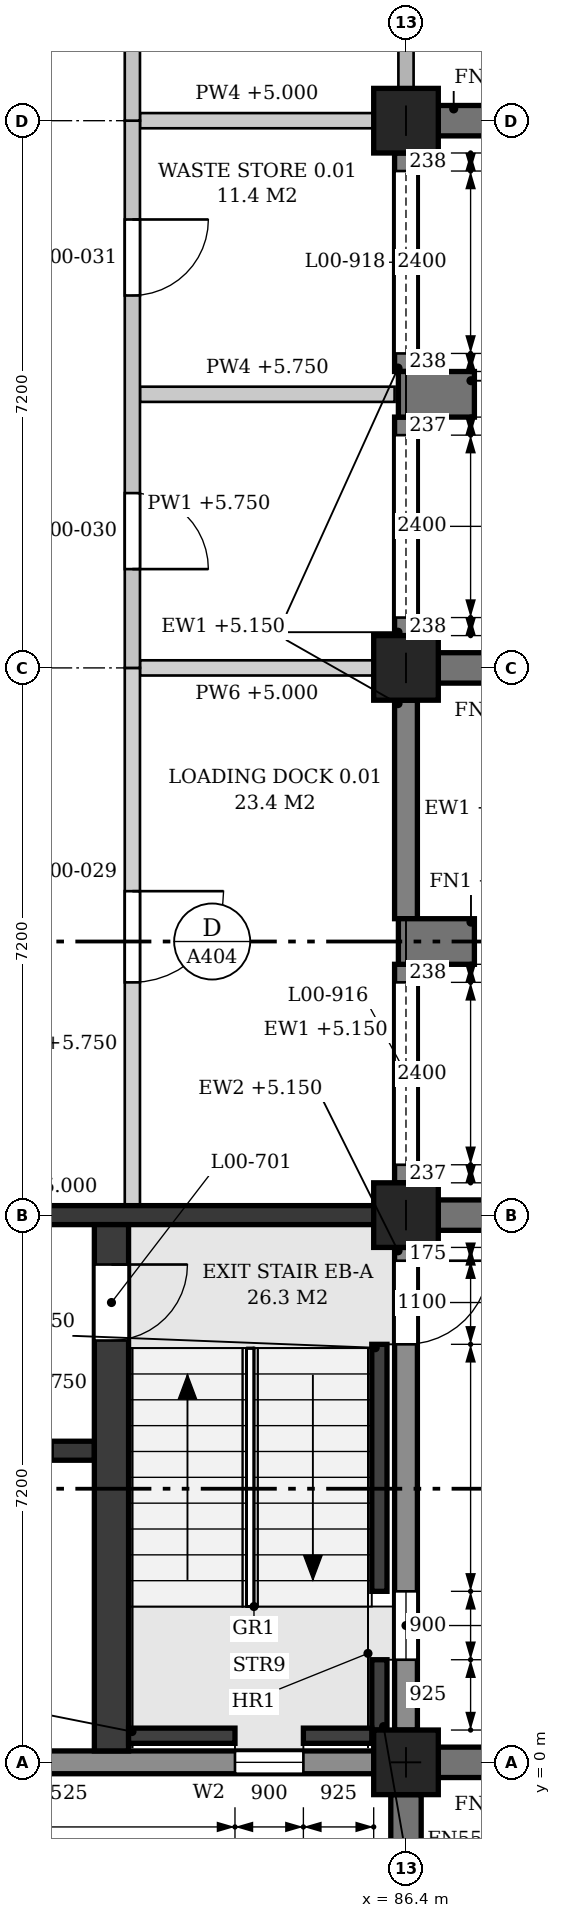
"""IFC4 building model, lengths in metres.
Left out: names, types, materials, properties, quantities, classifications, styles, units other than length and angle.
Written with IfcOpenShell. Run it as: python <this file> out.ifc"""

import sys

from ifc_helpers import new_model, si_unit, direction, frame, frame_2d, origin, origin_2d, place, context, subcontext, project, spatial, polyline, rectangle, outline, extrude, element, fill, save


model = new_model("IFC4")
c1 = context("Model", 3, precision=1e-05, world=origin(), true_north=direction((0.0, 1.0)))
c2 = subcontext(c1, "Body", "Model", "MODEL_VIEW")
j1 = project(units=[si_unit("LENGTHUNIT", "METRE"), si_unit("PLANEANGLEUNIT", "RADIAN")], contexts=[c1])
p1 = place(None, origin())
s1 = spatial("IfcSite", under=j1, at=p1, CompositionType="ELEMENT")
p2 = place(p1, origin())
s2 = spatial("IfcBuilding", under=s1, at=p2, CompositionType="ELEMENT")
p3 = place(p2, origin())
s3 = spatial("IfcBuildingStorey", under=s2, at=p3, CompositionType="ELEMENT", Elevation=0.0)
for number, where, z_axis, x_axis in (
    (1, (86.4, 0.0, 0.0), (0.0, 0.0, 1.0), (1.0, 0.0, 0.0)),
    (2, (86.4, 7.2, 0.0), (0.0, 0.0, 1.0), (1.0, 0.0, 0.0)),
    (3, (86.4, 14.4, 0.0), (0.0, 0.0, 1.0), (1.0, 0.0, 0.0)),
    (4, (86.4, 21.6, 0.0), (0.0, 0.0, 1.0), (1.0, 0.0, 0.0)),
):
    element("IfcColumn", number, at=place(p3, frame(where, z_axis=z_axis, x_axis=x_axis)), inside=s3, PredefinedType="COLUMN", context=c2, shape_type="SweptSolid", body=[
        extrude(rectangle(XDim=0.85, YDim=0.85, at=origin_2d()), origin(), (0.0, 0.0, 1.0), 6.0),
    ])
p4 = place(p3, frame((79.625, 0.0, 0.0), z_axis=(0.0, 0.0, 1.0), x_axis=(1.0, 0.0, 0.0)))
e5 = element("IfcWall", 5, at=p4, inside=s3, PredefinedType="STANDARD", context=c2, shape_type="SweptSolid", body=[
    extrude(rectangle(XDim=6.35, YDim=0.3, at=frame_2d((3.175, 0.0))), origin(), (0.0, 0.0, 1.0), 5.15),
])
p5 = place(p4, frame((4.525, 0.0, 0.9)))
e6 = element("IfcOpeningElement", 6, at=p5, cuts=e5, PredefinedType="OPENING", context=c2, shape_type="SweptSolid", body=[
    extrude(outline(polyline([(0.0, 0.0), (0.9, 0.0), (0.9, 3.55), (0.45, 4.0), (0.0, 3.55), (0.0, 0.0)])), frame((0.0, 0.16, 0.0), z_axis=(0.0, -1.0, 0.0), x_axis=(1.0, 0.0, 0.0)), (0.0, 0.0, 1.0), 0.32),
])
p6 = place(p3, frame((86.4, 0.425, 0.0), z_axis=(0.0, 0.0, 1.0), x_axis=(0.0, 1.0, 0.0)))
e7 = element("IfcWall", 7, at=p6, inside=s3, PredefinedType="STANDARD", context=c2, shape_type="SweptSolid", body=[
    extrude(rectangle(XDim=6.35, YDim=0.3, at=frame_2d((3.175, 0.0))), origin(), (0.0, 0.0, 1.0), 5.15),
])
p7 = place(p6, frame((5.075, 0.0, 0.0)))
e8 = element("IfcOpeningElement", 8, at=p7, cuts=e7, PredefinedType="OPENING", context=c2, shape_type="SweptSolid", body=[
    extrude(rectangle(XDim=1.1, YDim=2.1, at=frame_2d((0.55, 1.05))), frame((0.0, 0.16, 0.0), z_axis=(0.0, -1.0, 0.0), x_axis=(1.0, 0.0, 0.0)), (0.0, 0.0, 1.0), 0.32),
])
p8 = place(p6, frame((0.925, 0.0, 0.9)))
e9 = element("IfcOpeningElement", 9, at=p8, cuts=e7, PredefinedType="OPENING", context=c2, shape_type="SweptSolid", body=[
    extrude(outline(polyline([(0.0, 0.0), (0.9, 0.0), (0.9, 3.55), (0.45, 4.0), (0.0, 3.55), (0.0, 0.0)])), frame((0.0, 0.16, 0.0), z_axis=(0.0, -1.0, 0.0), x_axis=(1.0, 0.0, 0.0)), (0.0, 0.0, 1.0), 0.32),
])
p9 = place(p3, frame((86.4, 7.625, 0.0), z_axis=(0.0, 0.0, 1.0), x_axis=(0.0, 1.0, 0.0)))
e10 = element("IfcWall", 10, at=p9, inside=s3, PredefinedType="STANDARD", context=c2, shape_type="SweptSolid", body=[
    extrude(rectangle(XDim=2.875, YDim=0.3, at=frame_2d((1.438, 0.0))), origin(), (0.0, 0.0, 1.0), 5.15),
])
p10 = place(p9, frame((0.238, 0.0, 0.0)))
e11 = element("IfcOpeningElement", 11, at=p10, cuts=e10, PredefinedType="OPENING", context=c2, shape_type="SweptSolid", body=[
    extrude(rectangle(XDim=2.4, YDim=3.5, at=frame_2d((1.2, 1.75))), frame((0.0, 0.16, 0.0), z_axis=(0.0, -1.0, 0.0), x_axis=(1.0, 0.0, 0.0)), (0.0, 0.0, 1.0), 0.32),
])
p11 = place(p3, frame((86.4, 11.1, 0.0), z_axis=(0.0, 0.0, 1.0), x_axis=(0.0, 1.0, 0.0)))
e12 = element("IfcWall", 12, at=p11, inside=s3, PredefinedType="STANDARD", context=c2, shape_type="SweptSolid", body=[
    extrude(rectangle(XDim=2.875, YDim=0.3, at=frame_2d((1.438, 0.0))), origin(), (0.0, 0.0, 1.0), 5.15),
])
p12 = place(p3, frame((86.4, 14.825, 0.0), z_axis=(0.0, 0.0, 1.0), x_axis=(0.0, 1.0, 0.0)))
e13 = element("IfcWall", 13, at=p12, inside=s3, PredefinedType="STANDARD", context=c2, shape_type="SweptSolid", body=[
    extrude(rectangle(XDim=2.875, YDim=0.3, at=frame_2d((1.438, 0.0))), origin(), (0.0, 0.0, 1.0), 5.15),
])
p13 = place(p12, frame((0.238, 0.0, 0.0)))
e14 = element("IfcOpeningElement", 14, at=p13, cuts=e13, PredefinedType="OPENING", context=c2, shape_type="SweptSolid", body=[
    extrude(rectangle(XDim=2.4, YDim=3.5, at=frame_2d((1.2, 1.75))), frame((0.0, 0.16, 0.0), z_axis=(0.0, -1.0, 0.0), x_axis=(1.0, 0.0, 0.0)), (0.0, 0.0, 1.0), 0.32),
])
p14 = place(p3, frame((86.4, 18.3, 0.0), z_axis=(0.0, 0.0, 1.0), x_axis=(0.0, 1.0, 0.0)))
e15 = element("IfcWall", 15, at=p14, inside=s3, PredefinedType="STANDARD", context=c2, shape_type="SweptSolid", body=[
    extrude(rectangle(XDim=2.875, YDim=0.3, at=frame_2d((1.438, 0.0))), origin(), (0.0, 0.0, 1.0), 5.15),
])
p15 = place(p14, frame((0.238, 0.0, 0.0)))
e16 = element("IfcOpeningElement", 16, at=p15, cuts=e15, PredefinedType="OPENING", context=c2, shape_type="SweptSolid", body=[
    extrude(rectangle(XDim=2.4, YDim=3.5, at=frame_2d((1.2, 1.75))), frame((0.0, 0.16, 0.0), z_axis=(0.0, -1.0, 0.0), x_axis=(1.0, 0.0, 0.0)), (0.0, 0.0, 1.0), 0.32),
])
for number, where, z_axis, x_axis in (
    (17, (86.3, 10.8, 0.0), (0.0, 0.0, 1.0), (1.0, 0.0, 0.0)),
    (18, (86.3, 18.0, 0.0), (0.0, 0.0, 1.0), (1.0, 0.0, 0.0)),
):
    element("IfcWall", number, at=place(p3, frame(where, z_axis=z_axis, x_axis=x_axis)), inside=s3, PredefinedType="POLYGONAL", context=c2, shape_type="SweptSolid", body=[
        extrude(outline(polyline([(1.0, 0.0), (1.0, 20.975), (0.75, 21.35), (0.35, 21.35), (0.35, 20.75), (0.0, 20.75), (0.0, 16.8), (0.35, 16.8), (0.35, 15.95), (0.0, 15.95), (0.0, 11.4), (0.35, 11.4), (0.35, 10.55), (0.0, 10.55), (0.0, 6.0), (0.35, 6.0), (0.35, 5.15), (0.0, 5.15), (0.0, 0.0), (1.0, 0.0)])), frame((0.0, 0.3, 0.0), z_axis=(0.0, -1.0, 0.0), x_axis=(1.0, 0.0, 0.0)), (0.0, 0.0, 1.0), 0.6),
    ])
for number, where, z_axis, x_axis in (
    (19, (86.4, -0.425, 0.0), (0.0, 0.0, 1.0), (0.0, -1.0, 0.0)),
    (20, (86.825, 0.0, 0.0), (0.0, 0.0, 1.0), (1.0, 0.0, 0.0)),
    (21, (86.825, 7.2, 0.0), (0.0, 0.0, 1.0), (1.0, 0.0, 0.0)),
    (22, (86.825, 14.4, 0.0), (0.0, 0.0, 1.0), (1.0, 0.0, 0.0)),
    (23, (86.825, 21.6, 0.0), (0.0, 0.0, 1.0), (1.0, 0.0, 0.0)),
):
    element("IfcWall", number, at=place(p3, frame(where, z_axis=z_axis, x_axis=x_axis)), inside=s3, PredefinedType="POLYGONAL", context=c2, shape_type="SweptSolid", body=[
        extrude(outline(polyline([(1.2, 0.0), (1.2, 20.825), (0.85, 21.35), (0.0, 21.35), (0.0, 0.0), (1.2, 0.0)])), frame((0.0, 0.2, 0.0), z_axis=(0.0, -1.0, 0.0), x_axis=(1.0, 0.0, 0.0)), (0.0, 0.0, 1.0), 0.4),
    ])
p16 = place(p3, frame((79.625, 7.2, 0.0), z_axis=(0.0, 0.0, 1.0), x_axis=(1.0, 0.0, 0.0)))
e24 = element("IfcWall", 24, at=p16, inside=s3, PredefinedType="SHEAR", context=c2, shape_type="SweptSolid", body=[
    extrude(rectangle(XDim=6.35, YDim=0.25, at=frame_2d((3.175, 0.0))), origin(), (0.0, 0.0, 1.0), 5.0),
])
p17 = place(p16, frame((0.425, 0.0, 0.0)))
e25 = element("IfcOpeningElement", 25, at=p17, cuts=e24, PredefinedType="OPENING", context=c2, shape_type="SweptSolid", body=[
    extrude(rectangle(XDim=1.1, YDim=2.1, at=frame_2d((0.55, 1.05))), frame((0.0, 0.135, 0.0), z_axis=(0.0, -1.0, 0.0), x_axis=(1.0, 0.0, 0.0)), (0.0, 0.0, 1.0), 0.27),
])
p18 = place(p3, frame((86.05, 0.425, -0.3), z_axis=(0.0, 0.0, 1.0), x_axis=(0.0, 1.0, 0.0)))
e26 = element("IfcWall", 26, at=p18, inside=s3, PredefinedType="SHEAR", context=c2, shape_type="SweptSolid", body=[
    extrude(rectangle(XDim=0.925, YDim=0.2, at=frame_2d((0.462, 0.0))), origin(), (0.0, 0.0, 1.0), 6.05),
])
p19 = place(p3, frame((86.05, 2.25, -0.3), z_axis=(0.0, 0.0, 1.0), x_axis=(0.0, 1.0, 0.0)))
e27 = element("IfcWall", 27, at=p19, inside=s3, PredefinedType="SHEAR", context=c2, shape_type="SweptSolid", body=[
    extrude(rectangle(XDim=3.25, YDim=0.2, at=frame_2d((1.625, 0.0))), origin(), (0.0, 0.0, 1.0), 6.05),
])
p20 = place(p3, frame((82.75, 0.35, -0.3), z_axis=(0.0, 0.0, 1.0), x_axis=(1.0, 0.0, 0.0)))
e28 = element("IfcWall", 28, at=p20, inside=s3, PredefinedType="SHEAR", context=c2, shape_type="SweptSolid", body=[
    extrude(rectangle(XDim=1.4, YDim=0.2, at=frame_2d((0.7, 0.0))), origin(), (0.0, 0.0, 1.0), 6.05),
])
p21 = place(p3, frame((85.05, 0.35, -0.3), z_axis=(0.0, 0.0, 1.0), x_axis=(1.0, 0.0, 0.0)))
e29 = element("IfcWall", 29, at=p21, inside=s3, PredefinedType="SHEAR", context=c2, shape_type="SweptSolid", body=[
    extrude(rectangle(XDim=0.9, YDim=0.2, at=frame_2d((0.45, 0.0))), origin(), (0.0, 0.0, 1.0), 6.05),
])
p22 = place(p3, frame((82.525, 0.15, 0.0), z_axis=(0.0, 0.0, 1.0), x_axis=(0.0, 1.0, 0.0)))
e30 = element("IfcWall", 30, at=p22, inside=s3, PredefinedType="SHEAR", context=c2, shape_type="SweptSolid", body=[
    extrude(rectangle(XDim=6.925, YDim=0.45, at=frame_2d((3.462, 0.0))), origin(), (0.0, 0.0, 1.0), 5.75),
])
p23 = place(p22, frame((5.4, 0.0, 0.0)))
e31 = element("IfcOpeningElement", 31, at=p23, cuts=e30, PredefinedType="OPENING", context=c2, shape_type="SweptSolid", body=[
    extrude(rectangle(XDim=1.0, YDim=2.1, at=frame_2d((0.5, 1.05))), frame((0.0, 0.235, 0.0), z_axis=(0.0, -1.0, 0.0), x_axis=(1.0, 0.0, 0.0)), (0.0, 0.0, 1.0), 0.47),
])
p24 = place(p3, frame((79.325, 4.1, 0.0), z_axis=(0.0, 0.0, 1.0), x_axis=(1.0, 0.0, 0.0)))
e32 = element("IfcWall", 32, at=p24, inside=s3, PredefinedType="SHEAR", context=c2, shape_type="SweptSolid", body=[
    extrude(rectangle(XDim=2.975, YDim=0.25, at=frame_2d((1.488, 0.0))), origin(), (0.0, 0.0, 1.0), 5.75),
])
p25 = place(p24, frame((1.525, 0.0, 0.0)))
e33 = element("IfcOpeningElement", 33, at=p25, cuts=e32, PredefinedType="OPENING", context=c2, shape_type="SweptSolid", body=[
    extrude(rectangle(XDim=0.9, YDim=2.1, at=frame_2d((0.45, 1.05))), frame((0.0, 0.135, 0.0), z_axis=(0.0, -1.0, 0.0), x_axis=(1.0, 0.0, 0.0)), (0.0, 0.0, 1.0), 0.27),
])
p26 = place(p3, frame((82.9, 14.4, 0.0), z_axis=(0.0, 0.0, 1.0), x_axis=(1.0, 0.0, 0.0)))
e34 = element("IfcWall", 34, at=p26, inside=s3, PredefinedType="PARTITIONING", context=c2, shape_type="SweptSolid", body=[
    extrude(rectangle(XDim=3.075, YDim=0.2, at=frame_2d((1.538, 0.0))), origin(), (0.0, 0.0, 1.0), 5.0),
])
p27 = place(p3, frame((82.9, 18.0, 0.0), z_axis=(0.0, 0.0, 1.0), x_axis=(1.0, 0.0, 0.0)))
e35 = element("IfcWall", 35, at=p27, inside=s3, PredefinedType="PARTITIONING", context=c2, shape_type="SweptSolid", body=[
    extrude(outline(polyline([(0.0, 0.0), (3.35, 0.0), (3.35, 5.15), (3.25, 5.15), (3.25, 5.75), (0.0, 5.75), (0.0, 0.0)])), frame((0.0, 0.1, 0.0), z_axis=(0.0, -1.0, 0.0), x_axis=(1.0, 0.0, 0.0)), (0.0, 0.0, 1.0), 0.2),
])
p28 = place(p3, frame((82.9, 21.6, 0.0), z_axis=(0.0, 0.0, 1.0), x_axis=(1.0, 0.0, 0.0)))
e36 = element("IfcWall", 36, at=p28, inside=s3, PredefinedType="PARTITIONING", context=c2, shape_type="SweptSolid", body=[
    extrude(rectangle(XDim=3.075, YDim=0.2, at=frame_2d((1.538, 0.0))), origin(), (0.0, 0.0, 1.0), 5.0),
])
p29 = place(p3, frame((82.8, 7.325, 0.0), z_axis=(0.0, 0.0, 1.0), x_axis=(0.0, 1.0, 0.0)))
e37 = element("IfcWall", 37, at=p29, inside=s3, PredefinedType="PARTITIONING", context=c2, shape_type="SweptSolid", body=[
    extrude(outline(polyline([(0.0, 0.0), (7.075, 0.0), (7.075, 5.0), (6.825, 5.0), (6.825, 5.75), (0.125, 5.75), (0.125, 5.0), (0.0, 5.0), (0.0, 0.0)])), frame((0.0, 0.1, 0.0), z_axis=(0.0, -1.0, 0.0), x_axis=(1.0, 0.0, 0.0)), (0.0, 0.0, 1.0), 0.2),
])
p30 = place(p29, frame((2.938, 0.0, 0.0)))
e38 = element("IfcOpeningElement", 38, at=p30, cuts=e37, PredefinedType="OPENING", context=c2, shape_type="SweptSolid", body=[
    extrude(rectangle(XDim=1.2, YDim=2.1, at=frame_2d((0.6, 1.05))), frame((0.0, 0.11, 0.0), z_axis=(0.0, -1.0, 0.0), x_axis=(1.0, 0.0, 0.0)), (0.0, 0.0, 1.0), 0.22),
])
p31 = place(p3, frame((82.8, 14.4, 0.0), z_axis=(0.0, 0.0, 1.0), x_axis=(0.0, 1.0, 0.0)))
e39 = element("IfcWall", 39, at=p31, inside=s3, PredefinedType="PARTITIONING", context=c2, shape_type="SweptSolid", body=[
    extrude(outline(polyline([(0.0, 0.0), (7.2, 0.0), (7.2, 5.0), (6.95, 5.0), (6.95, 5.75), (0.25, 5.75), (0.25, 5.0), (0.0, 5.0), (0.0, 0.0)])), frame((0.0, 0.1, 0.0), z_axis=(0.0, -1.0, 0.0), x_axis=(1.0, 0.0, 0.0)), (0.0, 0.0, 1.0), 0.2),
])
p32 = place(p31, frame((1.3, 0.0, 0.0)))
e40 = element("IfcOpeningElement", 40, at=p32, cuts=e39, PredefinedType="OPENING", context=c2, shape_type="SweptSolid", body=[
    extrude(rectangle(XDim=1.0, YDim=2.1, at=frame_2d((0.5, 1.05))), frame((0.0, 0.11, 0.0), z_axis=(0.0, -1.0, 0.0), x_axis=(1.0, 0.0, 0.0)), (0.0, 0.0, 1.0), 0.22),
])
p33 = place(p31, frame((4.9, 0.0, 0.0)))
e41 = element("IfcOpeningElement", 41, at=p33, cuts=e39, PredefinedType="OPENING", context=c2, shape_type="SweptSolid", body=[
    extrude(rectangle(XDim=1.0, YDim=2.1, at=frame_2d((0.5, 1.05))), frame((0.0, 0.11, 0.0), z_axis=(0.0, -1.0, 0.0), x_axis=(1.0, 0.0, 0.0)), (0.0, 0.0, 1.0), 0.22),
])
p34 = place(p3, frame((82.8, 21.6, 0.0), z_axis=(0.0, 0.0, 1.0), x_axis=(0.0, 1.0, 0.0)))
e42 = element("IfcWall", 42, at=p34, inside=s3, PredefinedType="PARTITIONING", context=c2, shape_type="SweptSolid", body=[
    extrude(outline(polyline([(0.0, 0.0), (7.2, 0.0), (7.2, 5.0), (6.95, 5.0), (6.95, 5.75), (0.25, 5.75), (0.25, 5.0), (0.0, 5.0), (0.0, 0.0)])), frame((0.0, 0.1, 0.0), z_axis=(0.0, -1.0, 0.0), x_axis=(1.0, 0.0, 0.0)), (0.0, 0.0, 1.0), 0.2),
])
p35 = place(p34, frame((2.6, 0.0, 0.0)))
e43 = element("IfcOpeningElement", 43, at=p35, cuts=e42, PredefinedType="OPENING", context=c2, shape_type="SweptSolid", body=[
    extrude(rectangle(XDim=2.0, YDim=2.1, at=frame_2d((1.0, 1.05))), frame((0.0, 0.11, 0.0), z_axis=(0.0, -1.0, 0.0), x_axis=(1.0, 0.0, 0.0)), (0.0, 0.0, 1.0), 0.22),
])
p36 = place(p7, frame((1.1, 0.0, 0.0), z_axis=(0.0, 0.0, 1.0), x_axis=(-1.0, 0.0, 0.0)))
e44 = element("IfcDoor", 44, at=p36, inside=s3, OperationType="SINGLE_SWING_LEFT", PredefinedType="DOOR", context=c2, shape_type="SweptSolid", body=[
    extrude(rectangle(XDim=1.1, YDim=2.1, at=frame_2d((0.55, 1.05))), frame((0.0, 0.025, 0.0), z_axis=(0.0, -1.0, 0.0), x_axis=(1.0, 0.0, 0.0)), (0.0, 0.0, 1.0), 0.05),
])
fill(e8, e44)
p37 = place(p10, frame((2.4, 0.0, 0.0), z_axis=(0.0, 0.0, 1.0), x_axis=(-1.0, 0.0, 0.0)))
e45 = element("IfcDoor", 45, at=p37, inside=s3, OperationType="ROLLINGUP", PredefinedType="DOOR", context=c2, shape_type="SweptSolid", body=[
    extrude(rectangle(XDim=2.4, YDim=3.5, at=frame_2d((1.2, 1.75))), frame((0.0, 0.025, 0.0), z_axis=(0.0, -1.0, 0.0), x_axis=(1.0, 0.0, 0.0)), (0.0, 0.0, 1.0), 0.05),
])
fill(e11, e45)
p38 = place(p13, frame((2.4, 0.0, 0.0), z_axis=(0.0, 0.0, 1.0), x_axis=(-1.0, 0.0, 0.0)))
e46 = element("IfcDoor", 46, at=p38, inside=s3, OperationType="ROLLINGUP", PredefinedType="DOOR", context=c2, shape_type="SweptSolid", body=[
    extrude(rectangle(XDim=2.4, YDim=3.5, at=frame_2d((1.2, 1.75))), frame((0.0, 0.025, 0.0), z_axis=(0.0, -1.0, 0.0), x_axis=(1.0, 0.0, 0.0)), (0.0, 0.0, 1.0), 0.05),
])
fill(e14, e46)
p39 = place(p15, frame((2.4, 0.0, 0.0), z_axis=(0.0, 0.0, 1.0), x_axis=(-1.0, 0.0, 0.0)))
e47 = element("IfcDoor", 47, at=p39, inside=s3, OperationType="ROLLINGUP", PredefinedType="DOOR", context=c2, shape_type="SweptSolid", body=[
    extrude(rectangle(XDim=2.4, YDim=3.5, at=frame_2d((1.2, 1.75))), frame((0.0, 0.025, 0.0), z_axis=(0.0, -1.0, 0.0), x_axis=(1.0, 0.0, 0.0)), (0.0, 0.0, 1.0), 0.05),
])
fill(e16, e47)
p40 = place(p8, origin())
e48 = element("IfcWindow", 48, at=p40, inside=s3, PartitioningType="SINGLE_PANEL", PredefinedType="WINDOW", context=c2, shape_type="SweptSolid", body=[
    extrude(outline(polyline([(0.0, 0.0), (0.9, 0.0), (0.9, 3.55), (0.45, 4.0), (0.0, 3.55), (0.0, 0.0)])), frame((0.0, 0.03, 0.0), z_axis=(0.0, -1.0, 0.0), x_axis=(1.0, 0.0, 0.0)), (0.0, 0.0, 1.0), 0.06),
])
fill(e9, e48)
p41 = place(p5, origin())
e49 = element("IfcWindow", 49, at=p41, inside=s3, PartitioningType="SINGLE_PANEL", PredefinedType="WINDOW", context=c2, shape_type="SweptSolid", body=[
    extrude(outline(polyline([(0.0, 0.0), (0.9, 0.0), (0.9, 3.55), (0.45, 4.0), (0.0, 3.55), (0.0, 0.0)])), frame((0.0, 0.03, 0.0), z_axis=(0.0, -1.0, 0.0), x_axis=(1.0, 0.0, 0.0)), (0.0, 0.0, 1.0), 0.06),
])
fill(e6, e49)
p42 = place(p23, frame((1.0, 0.0, 0.0), z_axis=(0.0, 0.0, 1.0), x_axis=(-1.0, 0.0, 0.0)))
e50 = element("IfcDoor", 50, at=p42, inside=s3, OperationType="SINGLE_SWING_LEFT", PredefinedType="DOOR", context=c2, shape_type="SweptSolid", body=[
    extrude(rectangle(XDim=1.0, YDim=2.1, at=frame_2d((0.5, 1.05))), frame((0.0, 0.025, 0.0), z_axis=(0.0, -1.0, 0.0), x_axis=(1.0, 0.0, 0.0)), (0.0, 0.0, 1.0), 0.05),
])
fill(e31, e50)
p43 = place(p30, frame((1.2, 0.0, 0.0), z_axis=(0.0, 0.0, 1.0), x_axis=(-1.0, 0.0, 0.0)))
e51 = element("IfcDoor", 51, at=p43, inside=s3, OperationType="SINGLE_SWING_LEFT", PredefinedType="DOOR", context=c2, shape_type="SweptSolid", body=[
    extrude(rectangle(XDim=1.2, YDim=2.1, at=frame_2d((0.6, 1.05))), frame((0.0, 0.025, 0.0), z_axis=(0.0, -1.0, 0.0), x_axis=(1.0, 0.0, 0.0)), (0.0, 0.0, 1.0), 0.05),
])
fill(e38, e51)
p44 = place(p32, frame((1.0, 0.0, 0.0), z_axis=(0.0, 0.0, 1.0), x_axis=(-1.0, 0.0, 0.0)))
e52 = element("IfcDoor", 52, at=p44, inside=s3, OperationType="SINGLE_SWING_RIGHT", PredefinedType="DOOR", context=c2, shape_type="SweptSolid", body=[
    extrude(rectangle(XDim=1.0, YDim=2.1, at=frame_2d((0.5, 1.05))), frame((0.0, 0.025, 0.0), z_axis=(0.0, -1.0, 0.0), x_axis=(1.0, 0.0, 0.0)), (0.0, 0.0, 1.0), 0.05),
])
fill(e40, e52)
p45 = place(p33, frame((1.0, 0.0, 0.0), z_axis=(0.0, 0.0, 1.0), x_axis=(-1.0, 0.0, 0.0)))
e53 = element("IfcDoor", 53, at=p45, inside=s3, OperationType="SINGLE_SWING_LEFT", PredefinedType="DOOR", context=c2, shape_type="SweptSolid", body=[
    extrude(rectangle(XDim=1.0, YDim=2.1, at=frame_2d((0.5, 1.05))), frame((0.0, 0.025, 0.0), z_axis=(0.0, -1.0, 0.0), x_axis=(1.0, 0.0, 0.0)), (0.0, 0.0, 1.0), 0.05),
])
fill(e41, e53)
save(model, sys.argv[1])
